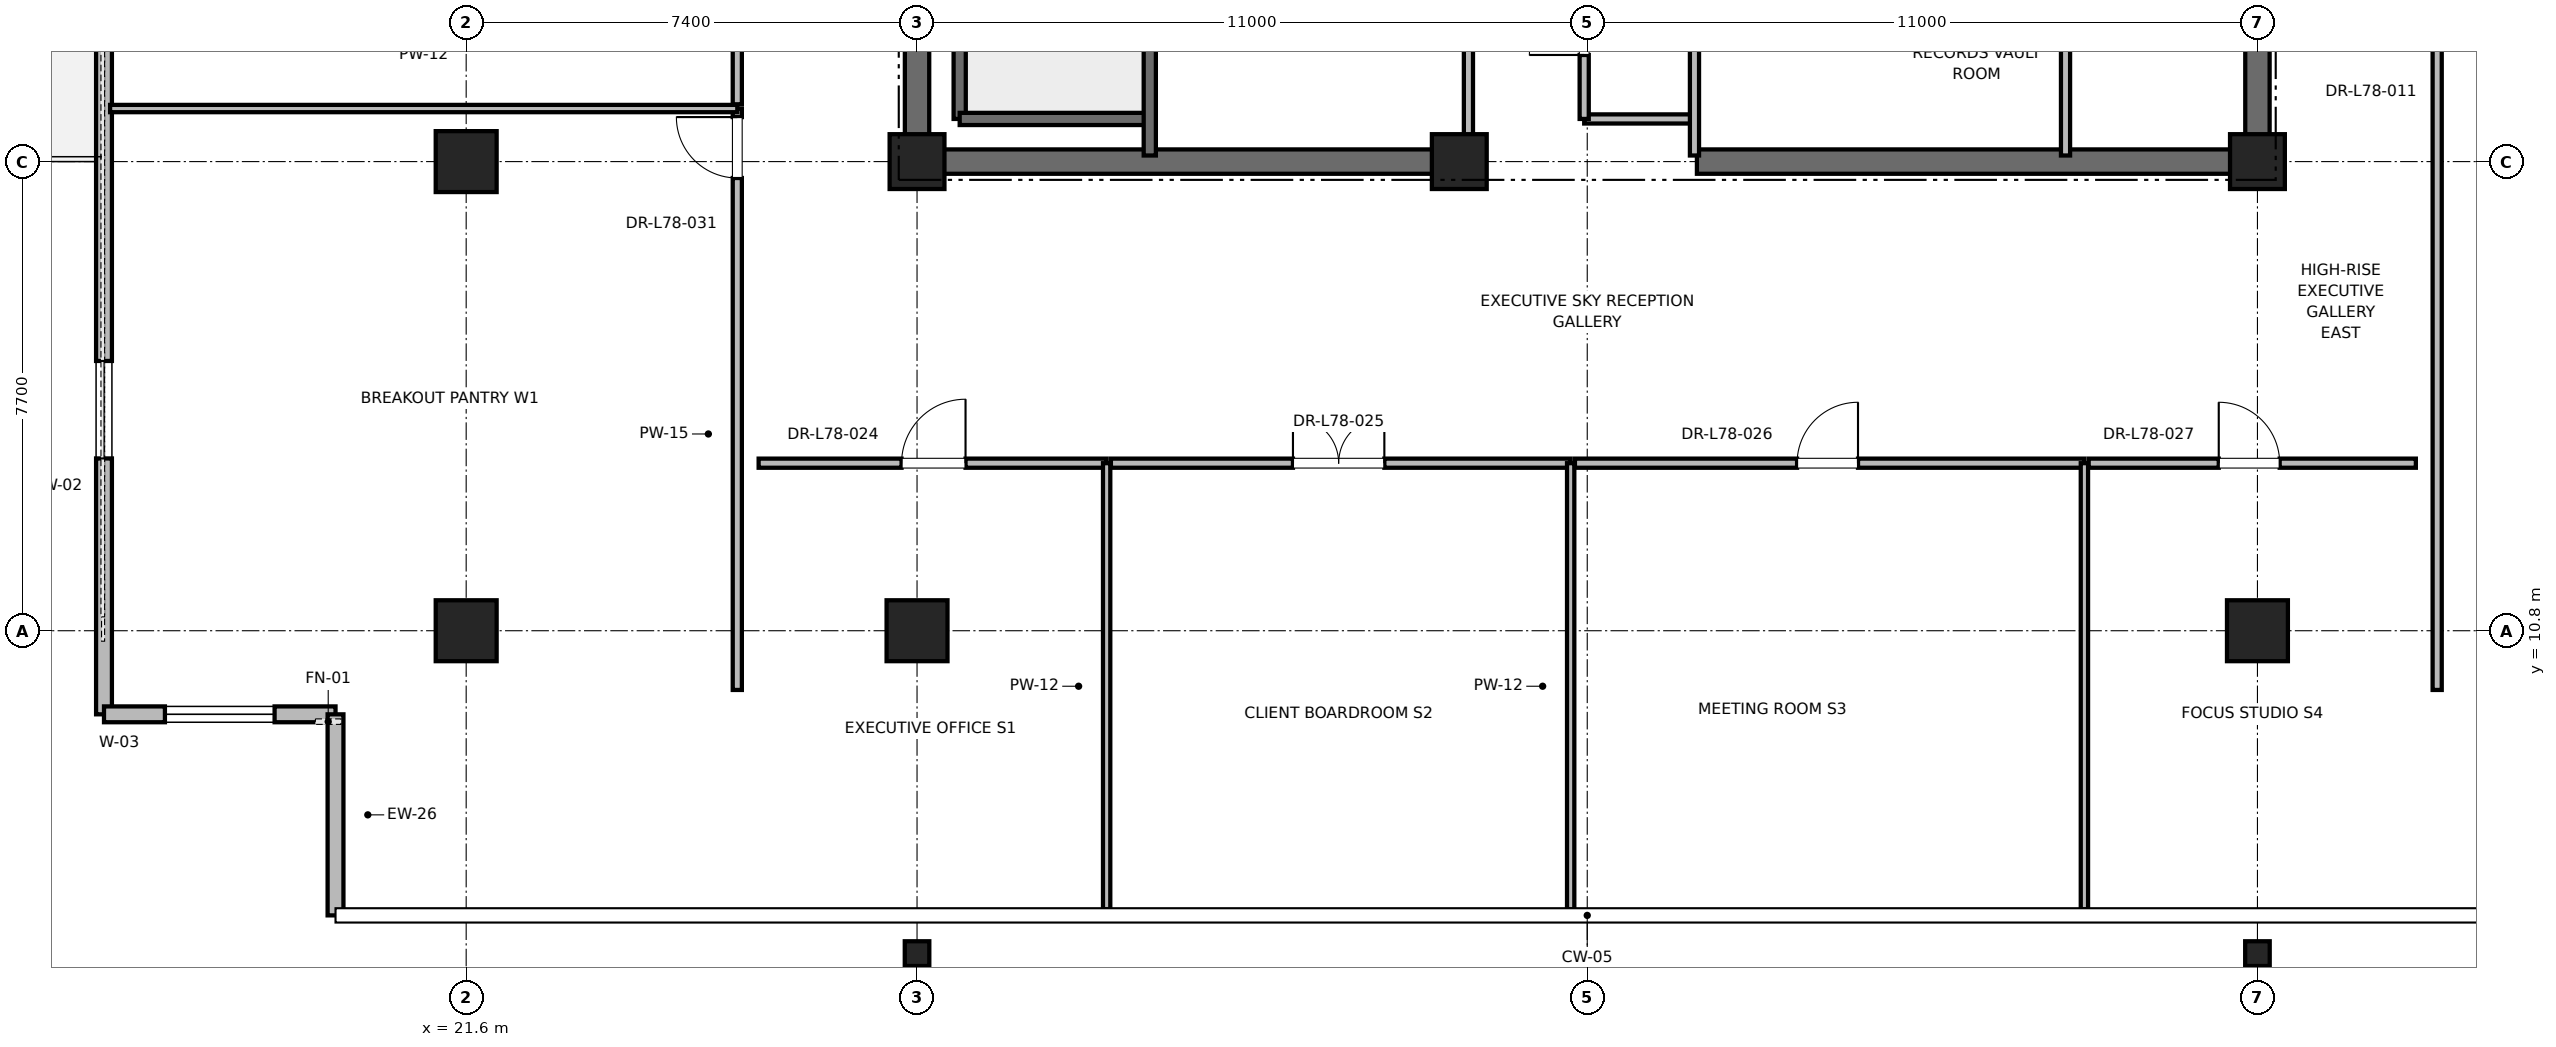
"""IFC4 building model, lengths in metres.
Left out: names, types, materials, properties, quantities, classifications, styles, units other than length and angle.
Written with IfcOpenShell. Run it as: python <this file> out.ifc"""

import sys

from ifc_helpers import new_model, si_unit, direction, frame, frame_2d, origin, origin_2d, place, context, subcontext, project, spatial, rectangle, i_section, extrude, element, fill, save


model = new_model("IFC4")
c1 = context("Model", 3, precision=1e-05, world=origin(), true_north=direction((0.0, 1.0)))
c2 = subcontext(c1, "Body", "Model", "MODEL_VIEW")
j1 = project(units=[si_unit("LENGTHUNIT", "METRE"), si_unit("PLANEANGLEUNIT", "RADIAN")], contexts=[c1])
p1 = place(None, origin())
s1 = spatial("IfcSite", under=j1, at=p1, CompositionType="ELEMENT")
p2 = place(p1, origin())
s2 = spatial("IfcBuilding", under=s1, at=p2, CompositionType="ELEMENT")
p3 = place(p2, frame((0.0, 0.0, 334.8)))
s3 = spatial("IfcBuildingStorey", under=s2, at=p3, CompositionType="ELEMENT", Elevation=334.8)
for number, where, z_axis, x_axis in (
    (1, (29.0, 10.8, 0.0), (0.0, 0.0, 1.0), (1.0, 0.0, 0.0)),
    (2, (51.0, 10.8, 0.0), (0.0, 0.0, 1.0), (1.0, 0.0, 0.0)),
    (3, (21.6, 18.5, 0.0), (0.0, 0.0, 1.0), (1.0, 0.0, 0.0)),
    (4, (21.6, 10.8, 0.0), (0.0, 0.0, 1.0), (1.0, 0.0, 0.0)),
):
    element("IfcColumn", number, at=place(p3, frame(where, z_axis=z_axis, x_axis=x_axis)), inside=s3, PredefinedType="COLUMN", context=c2, shape_type="SweptSolid", body=[
        extrude(rectangle(XDim=1.0, YDim=1.0, at=origin_2d()), origin(), (0.0, 0.0, 1.0), 4.0),
    ])
for number, where, z_axis, x_axis in (
    (5, (29.0, 5.5, 0.0), (0.0, 0.0, 1.0), (1.0, 0.0, 0.0)),
    (6, (51.0, 5.5, 0.0), (0.0, 0.0, 1.0), (1.0, 0.0, 0.0)),
):
    element("IfcColumn", number, at=place(p3, frame(where, z_axis=z_axis, x_axis=x_axis)), inside=s3, PredefinedType="COLUMN", context=c2, shape_type="SweptSolid", body=[
        extrude(i_section(OverallWidth=0.403, OverallDepth=0.406, WebThickness=0.027, FlangeThickness=0.043, FilletRadius=0.015, at=origin_2d()), origin(), (0.0, 0.0, 1.0), 4.0),
    ])
for number, where, z_axis, x_axis in (
    (7, (29.0, 18.5, 0.0), (0.0, 0.0, 1.0), (1.0, 0.0, 0.0)),
    (8, (51.0, 18.5, 0.0), (0.0, 0.0, 1.0), (1.0, 0.0, 0.0)),
    (9, (37.9, 18.5, 0.0), (0.0, 0.0, 1.0), (1.0, 0.0, 0.0)),
):
    element("IfcColumn", number, at=place(p3, frame(where, z_axis=z_axis, x_axis=x_axis)), inside=s3, PredefinedType="PILASTER", context=c2, shape_type="SweptSolid", body=[
        extrude(rectangle(XDim=0.9, YDim=0.9, at=origin_2d()), origin(), (0.0, 0.0, 1.0), 4.0),
    ])
for number, where, z_axis, x_axis in (
    (10, (29.0, 18.5, 0.0), (0.0, 0.0, 1.0), (1.0, 0.0, 0.0)),
    (11, (41.8, 18.5, 0.0), (0.0, 0.0, 1.0), (1.0, 0.0, 0.0)),
):
    element("IfcWall", number, at=place(p3, frame(where, z_axis=z_axis, x_axis=x_axis)), inside=s3, PredefinedType="SHEAR", context=c2, shape_type="SweptSolid", body=[
        extrude(rectangle(XDim=9.2, YDim=0.4, at=frame_2d((4.6, 0.0))), origin(), (0.0, 0.0, 1.0), 3.785),
    ])
p4 = place(p3, frame((29.0, 18.5, 0.0), z_axis=(0.0, 0.0, 1.0), x_axis=(0.0, 1.0, 0.0)))
e12 = element("IfcWall", 12, at=p4, inside=s3, PredefinedType="SHEAR", context=c2, shape_type="SweptSolid", body=[
    extrude(rectangle(XDim=8.8, YDim=0.4, at=frame_2d((4.4, 0.0))), origin(), (0.0, 0.0, 1.0), 3.785),
])
p5 = place(p3, frame((51.0, 18.5, 0.0), z_axis=(0.0, 0.0, 1.0), x_axis=(0.0, 1.0, 0.0)))
e13 = element("IfcWall", 13, at=p5, inside=s3, PredefinedType="SHEAR", context=c2, shape_type="SweptSolid", body=[
    extrude(rectangle(XDim=5.8, YDim=0.4, at=frame_2d((2.9, 0.0))), origin(), (0.0, 0.0, 1.0), 3.785),
])
p6 = place(p3, frame((15.656, 45.572, 0.0), z_axis=(0.0, 0.0, 1.0), x_axis=(0.0, -1.0, 0.0)))
e14 = element("IfcWall", 14, at=p6, inside=s3, PredefinedType="PARAPET", context=c2, shape_type="SweptSolid", body=[
    extrude(rectangle(XDim=36.145, YDim=0.26, at=frame_2d((18.072, 0.0))), origin(), (0.0, 0.0, 1.0), 3.196),
])
p7 = place(p6, frame((4.2, 0.0, 0.85)))
e15 = element("IfcOpeningElement", 15, at=p7, cuts=e14, PredefinedType="OPENING", context=c2, shape_type="SweptSolid", body=[
    extrude(rectangle(XDim=1.6, YDim=2.1, at=frame_2d((0.8, 1.05))), frame((0.0, 0.13, 0.0), z_axis=(0.0, -1.0, 0.0), x_axis=(1.0, 0.0, 0.0)), (0.0, 0.0, 1.0), 0.26),
])
p8 = place(p6, frame((17.472, 0.0, 0.0)))
e16 = element("IfcOpeningElement", 16, at=p8, cuts=e14, PredefinedType="OPENING", context=c2, shape_type="SweptSolid", body=[
    extrude(rectangle(XDim=1.2, YDim=2.2, at=frame_2d((0.6, 1.1))), frame((0.0, 0.13, 0.0), z_axis=(0.0, -1.0, 0.0), x_axis=(1.0, 0.0, 0.0)), (0.0, 0.0, 1.0), 0.26),
])
p9 = place(p6, frame((30.344, 0.0, 0.85)))
e17 = element("IfcOpeningElement", 17, at=p9, cuts=e14, PredefinedType="OPENING", context=c2, shape_type="SweptSolid", body=[
    extrude(rectangle(XDim=1.6, YDim=2.1, at=frame_2d((0.8, 1.05))), frame((0.0, 0.13, 0.0), z_axis=(0.0, -1.0, 0.0), x_axis=(1.0, 0.0, 0.0)), (0.0, 0.0, 1.0), 0.26),
])
p10 = place(p3, frame((15.656, 9.428, 0.0), z_axis=(0.0, 0.0, 1.0), x_axis=(1.0, 0.0, 0.0)))
e18 = element("IfcWall", 18, at=p10, inside=s3, PredefinedType="PARAPET", context=c2, shape_type="SweptSolid", body=[
    extrude(rectangle(XDim=3.8, YDim=0.26, at=frame_2d((1.9, 0.0))), origin(), (0.0, 0.0, 1.0), 3.785),
])
p11 = place(p10, frame((1.0, 0.0, 0.85)))
e19 = element("IfcOpeningElement", 19, at=p11, cuts=e18, PredefinedType="OPENING", context=c2, shape_type="SweptSolid", body=[
    extrude(rectangle(XDim=1.8, YDim=2.2, at=frame_2d((0.9, 1.1))), frame((0.0, 0.13, 0.0), z_axis=(0.0, -1.0, 0.0), x_axis=(1.0, 0.0, 0.0)), (0.0, 0.0, 1.0), 0.26),
])
p12 = place(p3, frame((19.456, 9.428, 0.0), z_axis=(0.0, 0.0, 1.0), x_axis=(0.0, -1.0, 0.0)))
e20 = element("IfcWall", 20, at=p12, inside=s3, PredefinedType="PARAPET", context=c2, shape_type="SweptSolid", body=[
    extrude(rectangle(XDim=3.3, YDim=0.26, at=frame_2d((1.65, 0.0))), origin(), (0.0, 0.0, 1.0), 3.785),
])
p13 = place(p3, frame((29.7, 19.2, 0.0), z_axis=(0.0, 0.0, 1.0), x_axis=(0.0, 1.0, 0.0)))
e21 = element("IfcWall", 21, at=p13, inside=s3, PredefinedType="SOLIDWALL", context=c2, shape_type="SweptSolid", body=[
    extrude(rectangle(XDim=8.15, YDim=0.2, at=frame_2d((4.075, 0.0))), origin(), (0.0, 0.0, 1.0), 3.785),
])
p14 = place(p3, frame((29.7, 19.2, 0.0), z_axis=(0.0, 0.0, 1.0), x_axis=(1.0, 0.0, 0.0)))
e22 = element("IfcWall", 22, at=p14, inside=s3, PredefinedType="SOLIDWALL", context=c2, shape_type="SweptSolid", body=[
    extrude(rectangle(XDim=3.12, YDim=0.2, at=frame_2d((1.56, 0.0))), origin(), (0.0, 0.0, 1.0), 3.785),
])
p15 = place(p3, frame((32.82, 18.6, 0.0), z_axis=(0.0, 0.0, 1.0), x_axis=(0.0, 1.0, 0.0)))
e23 = element("IfcWall", 23, at=p15, inside=s3, PredefinedType="SOLIDWALL", context=c2, shape_type="SweptSolid", body=[
    extrude(rectangle(XDim=8.78, YDim=0.2, at=frame_2d((4.39, 0.0))), origin(), (0.0, 0.0, 1.0), 3.785),
])
p16 = place(p3, frame((39.95, 19.2, 0.0), z_axis=(0.0, 0.0, 1.0), x_axis=(1.0, 0.0, 0.0)))
e24 = element("IfcWall", 24, at=p16, inside=s3, PredefinedType="PARTITIONING", context=c2, shape_type="SweptSolid", body=[
    extrude(rectangle(XDim=1.81, YDim=0.15, at=frame_2d((0.905, 0.0))), origin(), (0.0, 0.0, 1.0), 2.85),
])
p17 = place(p3, frame((41.76, 18.6, 0.0), z_axis=(0.0, 0.0, 1.0), x_axis=(0.0, 1.0, 0.0)))
e25 = element("IfcWall", 25, at=p17, inside=s3, PredefinedType="PARTITIONING", context=c2, shape_type="SweptSolid", body=[
    extrude(rectangle(XDim=3.6, YDim=0.15, at=frame_2d((1.8, 0.0))), origin(), (0.0, 0.0, 1.0), 2.85),
])
p18 = place(p3, frame((39.95, 19.2, 0.0), z_axis=(0.0, 0.0, 1.0), x_axis=(0.0, 1.0, 0.0)))
e26 = element("IfcWall", 26, at=p18, inside=s3, PredefinedType="PARTITIONING", context=c2, shape_type="SweptSolid", body=[
    extrude(rectangle(XDim=3.0, YDim=0.15, at=frame_2d((1.5, 0.0))), origin(), (0.0, 0.0, 1.0), 2.85),
])
p19 = place(p18, frame((1.05, 0.0, 0.0)))
e27 = element("IfcOpeningElement", 27, at=p19, cuts=e26, PredefinedType="OPENING", context=c2, shape_type="SweptSolid", body=[
    extrude(rectangle(XDim=0.9, YDim=2.1, at=frame_2d((0.45, 1.05))), frame((0.0, 0.075, 0.0), z_axis=(0.0, -1.0, 0.0), x_axis=(1.0, 0.0, 0.0)), (0.0, 0.0, 1.0), 0.15),
])
p20 = place(p3, frame((38.05, 18.6, 0.0), z_axis=(0.0, 0.0, 1.0), x_axis=(0.0, 1.0, 0.0)))
e28 = element("IfcWall", 28, at=p20, inside=s3, PredefinedType="PARTITIONING", context=c2, shape_type="SweptSolid", body=[
    extrude(rectangle(XDim=8.78, YDim=0.15, at=frame_2d((4.39, 0.0))), origin(), (0.0, 0.0, 1.0), 2.85),
])
p21 = place(p20, frame((3.89, 0.0, 0.0)))
e29 = element("IfcOpeningElement", 29, at=p21, cuts=e28, PredefinedType="OPENING", context=c2, shape_type="SweptSolid", body=[
    extrude(rectangle(XDim=1.0, YDim=2.15, at=frame_2d((0.5, 1.075))), frame((0.0, 0.075, 0.0), z_axis=(0.0, -1.0, 0.0), x_axis=(1.0, 0.0, 0.0)), (0.0, 0.0, 1.0), 0.15),
])
p22 = place(p3, frame((47.85, 18.6, 0.0), z_axis=(0.0, 0.0, 1.0), x_axis=(0.0, 1.0, 0.0)))
e30 = element("IfcWall", 30, at=p22, inside=s3, PredefinedType="PARTITIONING", context=c2, shape_type="SweptSolid", body=[
    extrude(rectangle(XDim=2.54, YDim=0.15, at=frame_2d((1.27, 0.0))), origin(), (0.0, 0.0, 1.0), 2.85),
])
p23 = place(p3, frame((26.4, 13.55, 0.0), z_axis=(0.0, 0.0, 1.0), x_axis=(1.0, 0.0, 0.0)))
e31 = element("IfcWall", 31, at=p23, inside=s3, PredefinedType="PARTITIONING", context=c2, shape_type="SweptSolid", body=[
    extrude(rectangle(XDim=5.712, YDim=0.15, at=frame_2d((2.856, 0.0))), origin(), (0.0, 0.0, 1.0), 2.85),
])
p24 = place(p23, frame((2.346, 0.0, 0.0)))
e32 = element("IfcOpeningElement", 32, at=p24, cuts=e31, PredefinedType="OPENING", context=c2, shape_type="SweptSolid", body=[
    extrude(rectangle(XDim=1.05, YDim=2.2, at=frame_2d((0.525, 1.1))), frame((0.0, 0.075, 0.0), z_axis=(0.0, -1.0, 0.0), x_axis=(1.0, 0.0, 0.0)), (0.0, 0.0, 1.0), 0.15),
])
p25 = place(p3, frame((32.112, 6.228, 0.0), z_axis=(0.0, 0.0, 1.0), x_axis=(0.0, 1.0, 0.0)))
e33 = element("IfcWall", 33, at=p25, inside=s3, PredefinedType="PARTITIONING", context=c2, shape_type="SweptSolid", body=[
    extrude(rectangle(XDim=7.322, YDim=0.12, at=frame_2d((3.661, 0.0))), origin(), (0.0, 0.0, 1.0), 2.415),
])
p26 = place(p3, frame((32.182, 13.55, 0.0), z_axis=(0.0, 0.0, 1.0), x_axis=(1.0, 0.0, 0.0)))
e34 = element("IfcWall", 34, at=p26, inside=s3, PredefinedType="PARTITIONING", context=c2, shape_type="SweptSolid", body=[
    extrude(rectangle(XDim=7.546, YDim=0.15, at=frame_2d((3.773, 0.0))), origin(), (0.0, 0.0, 1.0), 2.85),
])
p27 = place(p26, frame((2.988, 0.0, 0.0)))
e35 = element("IfcOpeningElement", 35, at=p27, cuts=e34, PredefinedType="OPENING", context=c2, shape_type="SweptSolid", body=[
    extrude(rectangle(XDim=1.5, YDim=2.25, at=frame_2d((0.75, 1.125))), frame((0.0, 0.075, 0.0), z_axis=(0.0, -1.0, 0.0), x_axis=(1.0, 0.0, 0.0)), (0.0, 0.0, 1.0), 0.15),
])
p28 = place(p3, frame((39.728, 6.228, 0.0), z_axis=(0.0, 0.0, 1.0), x_axis=(0.0, 1.0, 0.0)))
e36 = element("IfcWall", 36, at=p28, inside=s3, PredefinedType="PARTITIONING", context=c2, shape_type="SweptSolid", body=[
    extrude(rectangle(XDim=7.322, YDim=0.12, at=frame_2d((3.661, 0.0))), origin(), (0.0, 0.0, 1.0), 2.415),
])
p29 = place(p3, frame((39.798, 13.55, 0.0), z_axis=(0.0, 0.0, 1.0), x_axis=(1.0, 0.0, 0.0)))
e37 = element("IfcWall", 37, at=p29, inside=s3, PredefinedType="PARTITIONING", context=c2, shape_type="SweptSolid", body=[
    extrude(rectangle(XDim=8.362, YDim=0.15, at=frame_2d((4.181, 0.0))), origin(), (0.0, 0.0, 1.0), 2.85),
])
p30 = place(p29, frame((3.646, 0.0, 0.0)))
e38 = element("IfcOpeningElement", 38, at=p30, cuts=e37, PredefinedType="OPENING", context=c2, shape_type="SweptSolid", body=[
    extrude(rectangle(XDim=1.0, YDim=2.15, at=frame_2d((0.5, 1.075))), frame((0.0, 0.075, 0.0), z_axis=(0.0, -1.0, 0.0), x_axis=(1.0, 0.0, 0.0)), (0.0, 0.0, 1.0), 0.15),
])
p31 = place(p3, frame((48.16, 6.228, 0.0), z_axis=(0.0, 0.0, 1.0), x_axis=(0.0, 1.0, 0.0)))
e39 = element("IfcWall", 39, at=p31, inside=s3, PredefinedType="PARTITIONING", context=c2, shape_type="SweptSolid", body=[
    extrude(rectangle(XDim=7.322, YDim=0.12, at=frame_2d((3.661, 0.0))), origin(), (0.0, 0.0, 1.0), 2.415),
])
p32 = place(p3, frame((48.23, 13.55, 0.0), z_axis=(0.0, 0.0, 1.0), x_axis=(1.0, 0.0, 0.0)))
e40 = element("IfcWall", 40, at=p32, inside=s3, PredefinedType="PARTITIONING", context=c2, shape_type="SweptSolid", body=[
    extrude(rectangle(XDim=5.37, YDim=0.15, at=frame_2d((2.685, 0.0))), origin(), (0.0, 0.0, 1.0), 2.85),
])
p33 = place(p32, frame((2.135, 0.0, 0.0)))
e41 = element("IfcOpeningElement", 41, at=p33, cuts=e40, PredefinedType="OPENING", context=c2, shape_type="SweptSolid", body=[
    extrude(rectangle(XDim=1.0, YDim=2.15, at=frame_2d((0.5, 1.075))), frame((0.0, 0.075, 0.0), z_axis=(0.0, -1.0, 0.0), x_axis=(1.0, 0.0, 0.0)), (0.0, 0.0, 1.0), 0.15),
])
p34 = place(p3, frame((26.05, 9.828, 0.0), z_axis=(0.0, 0.0, 1.0), x_axis=(0.0, 1.0, 0.0)))
e42 = element("IfcWall", 42, at=p34, inside=s3, PredefinedType="PARTITIONING", context=c2, shape_type="SweptSolid", body=[
    extrude(rectangle(XDim=9.543, YDim=0.15, at=frame_2d((4.771, 0.0))), origin(), (0.0, 0.0, 1.0), 2.85),
])
p35 = place(p34, frame((8.403, 0.0, 0.0)))
e43 = element("IfcOpeningElement", 43, at=p35, cuts=e42, PredefinedType="OPENING", context=c2, shape_type="SweptSolid", body=[
    extrude(rectangle(XDim=1.0, YDim=2.15, at=frame_2d((0.5, 1.075))), frame((0.0, 0.075, 0.0), z_axis=(0.0, -1.0, 0.0), x_axis=(1.0, 0.0, 0.0)), (0.0, 0.0, 1.0), 0.15),
])
p36 = place(p3, frame((15.756, 19.371, 0.0), z_axis=(0.0, 0.0, 1.0), x_axis=(1.0, 0.0, 0.0)))
e44 = element("IfcWall", 44, at=p36, inside=s3, PredefinedType="PARTITIONING", context=c2, shape_type="SweptSolid", body=[
    extrude(rectangle(XDim=10.294, YDim=0.12, at=frame_2d((5.147, 0.0))), origin(), (0.0, 0.0, 1.0), 2.85),
])
p37 = place(p3, frame((26.05, 19.441, 0.0), z_axis=(0.0, 0.0, 1.0), x_axis=(0.0, 1.0, 0.0)))
e45 = element("IfcWall", 45, at=p37, inside=s3, PredefinedType="PARTITIONING", context=c2, shape_type="SweptSolid", body=[
    extrude(rectangle(XDim=13.714, YDim=0.15, at=frame_2d((6.857, 0.0))), origin(), (0.0, 0.0, 1.0), 2.85),
])
p38 = place(p37, frame((6.322, 0.0, 0.0)))
e46 = element("IfcOpeningElement", 46, at=p38, cuts=e45, PredefinedType="OPENING", context=c2, shape_type="SweptSolid", body=[
    extrude(rectangle(XDim=1.0, YDim=2.15, at=frame_2d((0.5, 1.075))), frame((0.0, 0.075, 0.0), z_axis=(0.0, -1.0, 0.0), x_axis=(1.0, 0.0, 0.0)), (0.0, 0.0, 1.0), 0.15),
])
p39 = place(p3, frame((53.95, 9.828, 0.0), z_axis=(0.0, 0.0, 1.0), x_axis=(0.0, 1.0, 0.0)))
e47 = element("IfcWall", 47, at=p39, inside=s3, PredefinedType="PARTITIONING", context=c2, shape_type="SweptSolid", body=[
    extrude(rectangle(XDim=13.431, YDim=0.15, at=frame_2d((6.715, 0.0))), origin(), (0.0, 0.0, 1.0), 2.85),
])
p40 = place(p39, frame((10.567, 0.0, 0.0)))
e48 = element("IfcOpeningElement", 48, at=p40, cuts=e47, PredefinedType="OPENING", context=c2, shape_type="SweptSolid", body=[
    extrude(rectangle(XDim=1.0, YDim=2.15, at=frame_2d((0.5, 1.075))), frame((0.0, 0.075, 0.0), z_axis=(0.0, -1.0, 0.0), x_axis=(1.0, 0.0, 0.0)), (0.0, 0.0, 1.0), 0.15),
])
p41 = place(p9, origin())
e49 = element("IfcWindow", 49, at=p41, inside=s3, PartitioningType="SINGLE_PANEL", PredefinedType="WINDOW", context=c2, shape_type="SweptSolid", body=[
    extrude(rectangle(XDim=1.6, YDim=2.1, at=frame_2d((0.8, 1.05))), frame((0.0, 0.03, 0.0), z_axis=(0.0, -1.0, 0.0), x_axis=(1.0, 0.0, 0.0)), (0.0, 0.0, 1.0), 0.06),
])
fill(e17, e49)
p42 = place(p11, origin())
e50 = element("IfcWindow", 50, at=p42, inside=s3, PartitioningType="SINGLE_PANEL", PredefinedType="WINDOW", context=c2, shape_type="SweptSolid", body=[
    extrude(rectangle(XDim=1.8, YDim=2.2, at=frame_2d((0.9, 1.1))), frame((0.0, 0.03, 0.0), z_axis=(0.0, -1.0, 0.0), x_axis=(1.0, 0.0, 0.0)), (0.0, 0.0, 1.0), 0.06),
])
fill(e19, e50)
p43 = place(p19, origin())
e51 = element("IfcDoor", 51, at=p43, inside=s3, OperationType="SINGLE_SWING_LEFT", PredefinedType="DOOR", context=c2, shape_type="SweptSolid", body=[
    extrude(rectangle(XDim=0.9, YDim=2.1, at=frame_2d((0.45, 1.05))), frame((0.0, 0.025, 0.0), z_axis=(0.0, -1.0, 0.0), x_axis=(1.0, 0.0, 0.0)), (0.0, 0.0, 1.0), 0.05),
])
fill(e27, e51)
p44 = place(p24, origin())
e52 = element("IfcDoor", 52, at=p44, inside=s3, OperationType="SINGLE_SWING_RIGHT", PredefinedType="DOOR", context=c2, shape_type="SweptSolid", body=[
    extrude(rectangle(XDim=1.05, YDim=2.2, at=frame_2d((0.525, 1.1))), frame((0.0, 0.025, 0.0), z_axis=(0.0, -1.0, 0.0), x_axis=(1.0, 0.0, 0.0)), (0.0, 0.0, 1.0), 0.05),
])
fill(e32, e52)
p45 = place(p27, origin())
e53 = element("IfcDoor", 53, at=p45, inside=s3, OperationType="DOUBLE_DOOR_SINGLE_SWING", PredefinedType="DOOR", context=c2, shape_type="SweptSolid", body=[
    extrude(rectangle(XDim=1.5, YDim=2.25, at=frame_2d((0.75, 1.125))), frame((0.0, 0.025, 0.0), z_axis=(0.0, -1.0, 0.0), x_axis=(1.0, 0.0, 0.0)), (0.0, 0.0, 1.0), 0.05),
])
fill(e35, e53)
p46 = place(p30, origin())
e54 = element("IfcDoor", 54, at=p46, inside=s3, OperationType="SINGLE_SWING_RIGHT", PredefinedType="DOOR", context=c2, shape_type="SweptSolid", body=[
    extrude(rectangle(XDim=1.0, YDim=2.15, at=frame_2d((0.5, 1.075))), frame((0.0, 0.025, 0.0), z_axis=(0.0, -1.0, 0.0), x_axis=(1.0, 0.0, 0.0)), (0.0, 0.0, 1.0), 0.05),
])
fill(e38, e54)
p47 = place(p33, origin())
e55 = element("IfcDoor", 55, at=p47, inside=s3, OperationType="SINGLE_SWING_LEFT", PredefinedType="DOOR", context=c2, shape_type="SweptSolid", body=[
    extrude(rectangle(XDim=1.0, YDim=2.15, at=frame_2d((0.5, 1.075))), frame((0.0, 0.025, 0.0), z_axis=(0.0, -1.0, 0.0), x_axis=(1.0, 0.0, 0.0)), (0.0, 0.0, 1.0), 0.05),
])
fill(e41, e55)
p48 = place(p35, origin())
e56 = element("IfcDoor", 56, at=p48, inside=s3, OperationType="SINGLE_SWING_RIGHT", PredefinedType="DOOR", context=c2, shape_type="SweptSolid", body=[
    extrude(rectangle(XDim=1.0, YDim=2.15, at=frame_2d((0.5, 1.075))), frame((0.0, 0.025, 0.0), z_axis=(0.0, -1.0, 0.0), x_axis=(1.0, 0.0, 0.0)), (0.0, 0.0, 1.0), 0.05),
])
fill(e43, e56)
save(model, sys.argv[1])
